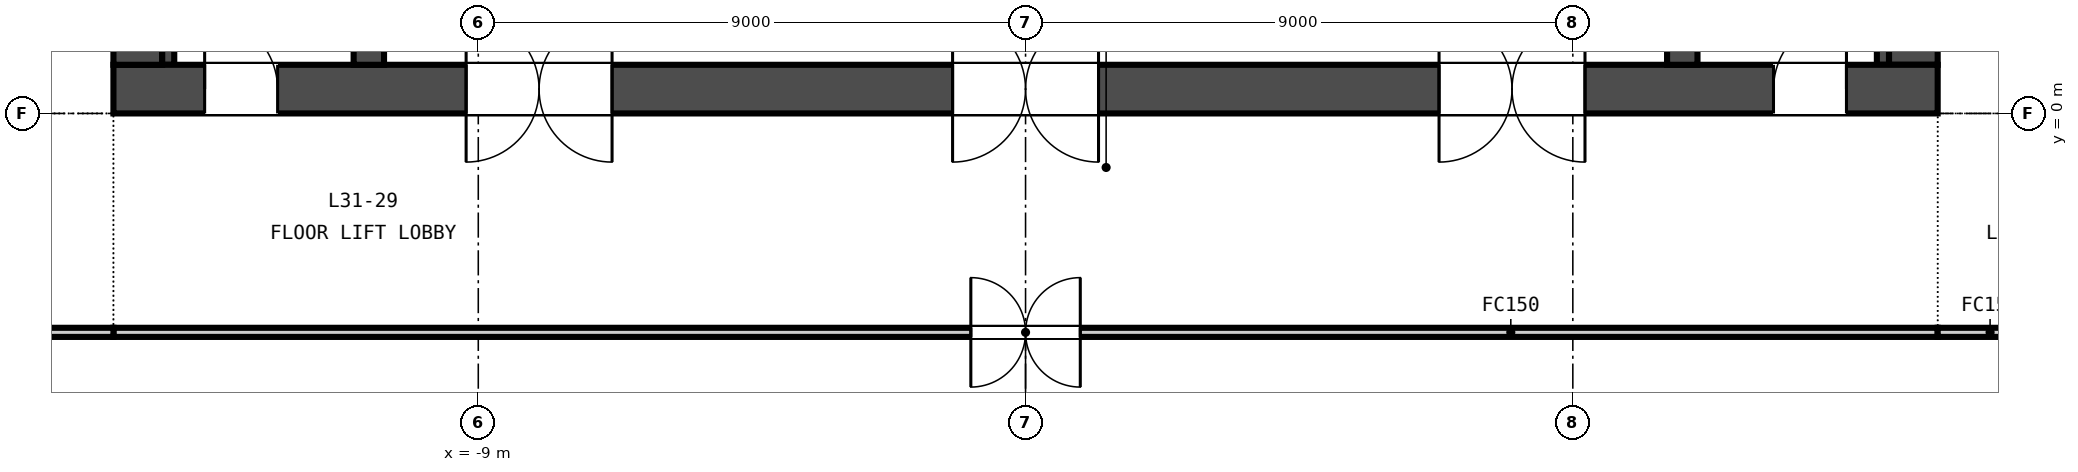
"""IFC4 building model, lengths in metres.
Left out: names, types, materials, properties, quantities, classifications, styles, units other than length and angle.
Written with IfcOpenShell. Run it as: python <this file> out.ifc"""

import sys

from ifc_helpers import new_model, si_unit, direction, frame, frame_2d, origin, place, context, subcontext, project, spatial, rectangle, extrude, element, fill, save


model = new_model("IFC4")
c1 = context("Model", 3, precision=1e-05, world=origin(), true_north=direction((0.0, 1.0)))
c2 = subcontext(c1, "Body", "Model", "MODEL_VIEW")
j1 = project(units=[si_unit("LENGTHUNIT", "METRE"), si_unit("PLANEANGLEUNIT", "RADIAN")], contexts=[c1])
p1 = place(None, origin())
s1 = spatial("IfcSite", under=j1, at=p1, CompositionType="ELEMENT")
p2 = place(p1, origin())
s2 = spatial("IfcBuilding", under=s1, at=p2, CompositionType="ELEMENT")
p3 = place(p2, frame((0.0, 0.0, 129.8)))
s3 = spatial("IfcBuildingStorey", under=s2, at=p3, CompositionType="ELEMENT", Elevation=129.8)
p4 = place(p3, frame((-15.0, 0.4, -0.15), z_axis=(0.0, 0.0, 1.0), x_axis=(1.0, 0.0, 0.0)))
e1 = element("IfcWall", 1, at=p4, inside=s3, PredefinedType="SOLIDWALL", context=c2, shape_type="SweptSolid", body=[
    extrude(rectangle(XDim=30.0, YDim=0.8, at=frame_2d((15.0, 0.0))), origin(), (0.0, 0.0, 1.0), 3.65),
])
p5 = place(p4, frame((5.8, 0.0, 0.15)))
e2 = element("IfcOpeningElement", 2, at=p5, cuts=e1, PredefinedType="OPENING", context=c2, shape_type="SweptSolid", body=[
    extrude(rectangle(XDim=2.4, YDim=2.4, at=frame_2d((1.2, 1.2))), frame((0.0, 0.41, 0.0), z_axis=(0.0, -1.0, 0.0), x_axis=(1.0, 0.0, 0.0)), (0.0, 0.0, 1.0), 0.82),
])
p6 = place(p4, frame((13.8, 0.0, 0.15)))
e3 = element("IfcOpeningElement", 3, at=p6, cuts=e1, PredefinedType="OPENING", context=c2, shape_type="SweptSolid", body=[
    extrude(rectangle(XDim=2.4, YDim=2.4, at=frame_2d((1.2, 1.2))), frame((0.0, 0.41, 0.0), z_axis=(0.0, -1.0, 0.0), x_axis=(1.0, 0.0, 0.0)), (0.0, 0.0, 1.0), 0.82),
])
p7 = place(p4, frame((21.8, 0.0, 0.15)))
e4 = element("IfcOpeningElement", 4, at=p7, cuts=e1, PredefinedType="OPENING", context=c2, shape_type="SweptSolid", body=[
    extrude(rectangle(XDim=2.4, YDim=2.4, at=frame_2d((1.2, 1.2))), frame((0.0, 0.41, 0.0), z_axis=(0.0, -1.0, 0.0), x_axis=(1.0, 0.0, 0.0)), (0.0, 0.0, 1.0), 0.82),
])
p8 = place(p4, frame((1.5, 0.0, 0.15)))
e5 = element("IfcOpeningElement", 5, at=p8, cuts=e1, PredefinedType="OPENING", context=c2, shape_type="SweptSolid", body=[
    extrude(rectangle(XDim=1.2, YDim=2.1, at=frame_2d((0.6, 1.05))), frame((0.0, 0.41, 0.0), z_axis=(0.0, -1.0, 0.0), x_axis=(1.0, 0.0, 0.0)), (0.0, 0.0, 1.0), 0.82),
])
p9 = place(p4, frame((27.3, 0.0, 0.15)))
e6 = element("IfcOpeningElement", 6, at=p9, cuts=e1, PredefinedType="OPENING", context=c2, shape_type="SweptSolid", body=[
    extrude(rectangle(XDim=1.2, YDim=2.1, at=frame_2d((0.6, 1.05))), frame((0.0, 0.41, 0.0), z_axis=(0.0, -1.0, 0.0), x_axis=(1.0, 0.0, 0.0)), (0.0, 0.0, 1.0), 0.82),
])
for number, where, z_axis, x_axis in (
    (7, (-14.6, 0.8, -0.15), (0.0, 0.0, 1.0), (0.0, 1.0, 0.0)),
    (8, (14.6, 0.8, -0.15), (0.0, 0.0, 1.0), (0.0, 1.0, 0.0)),
):
    element("IfcWall", number, at=place(p3, frame(where, z_axis=z_axis, x_axis=x_axis)), inside=s3, PredefinedType="SOLIDWALL", context=c2, shape_type="SweptSolid", body=[
        extrude(rectangle(XDim=13.4, YDim=0.8, at=frame_2d((6.7, 0.0))), origin(), (0.0, 0.0, 1.0), 3.65),
    ])
for number, where, z_axis, x_axis in (
    (9, (-10.8, 0.8, -0.15), (0.0, 0.0, 1.0), (0.0, 1.0, 0.0)),
    (10, (10.8, 0.8, -0.15), (0.0, 0.0, 1.0), (0.0, 1.0, 0.0)),
):
    element("IfcWall", number, at=place(p3, frame(where, z_axis=z_axis, x_axis=x_axis)), inside=s3, PredefinedType="SOLIDWALL", context=c2, shape_type="SweptSolid", body=[
        extrude(rectangle(XDim=13.4, YDim=0.5, at=frame_2d((6.7, 0.0))), origin(), (0.0, 0.0, 1.0), 3.65),
    ])
for number, where, z_axis, x_axis in (
    (11, (-14.1, 0.8, 0.0), (0.0, 0.0, 1.0), (0.0, 1.0, 0.0)),
    (12, (14.1, 0.8, 0.0), (0.0, 0.0, 1.0), (0.0, 1.0, 0.0)),
):
    element("IfcWall", number, at=place(p3, frame(where, z_axis=z_axis, x_axis=x_axis)), inside=s3, PredefinedType="SOLIDWALL", context=c2, shape_type="SweptSolid", body=[
        extrude(rectangle(XDim=13.4, YDim=0.2, at=frame_2d((6.7, 0.0))), origin(), (0.0, 0.0, 1.0), 3.5),
    ])
p10 = place(p3, frame((15.0, -3.6, 0.0), z_axis=(0.0, 0.0, 1.0), x_axis=(-1.0, 0.0, 0.0)))
e13 = element("IfcWall", 13, at=p10, inside=s3, PredefinedType="PARTITIONING", context=c2, shape_type="SweptSolid", body=[
    extrude(rectangle(XDim=30.0, YDim=0.15, at=frame_2d((15.0, 0.0))), origin(), (0.0, 0.0, 1.0), 2.741),
])
p11 = place(p10, frame((14.1, 0.0, 0.0)))
e14 = element("IfcOpeningElement", 14, at=p11, cuts=e13, PredefinedType="OPENING", context=c2, shape_type="SweptSolid", body=[
    extrude(rectangle(XDim=1.8, YDim=2.1, at=frame_2d((0.9, 1.05))), frame((0.0, 0.085, 0.0), z_axis=(0.0, -1.0, 0.0), x_axis=(1.0, 0.0, 0.0)), (0.0, 0.0, 1.0), 0.17),
])
p12 = place(p3, frame((16.714, -3.6, 0.0), z_axis=(0.0, 0.0, 1.0), x_axis=(-1.0, 0.0, 0.0)))
e15 = element("IfcWall", 15, at=p12, inside=s3, PredefinedType="PARTITIONING", context=c2, shape_type="SweptSolid", body=[
    extrude(rectangle(XDim=1.714, YDim=0.15, at=frame_2d((0.857, 0.0))), origin(), (0.0, 0.0, 1.0), 2.741),
])
p13 = place(p3, frame((-15.0, -3.6, 0.0), z_axis=(0.0, 0.0, 1.0), x_axis=(-1.0, 0.0, 0.0)))
e16 = element("IfcWall", 16, at=p13, inside=s3, PredefinedType="PARTITIONING", context=c2, shape_type="SweptSolid", body=[
    extrude(rectangle(XDim=3.9, YDim=0.15, at=frame_2d((1.95, 0.0))), origin(), (0.0, 0.0, 1.0), 2.741),
])
p14 = place(p5, origin())
e17 = element("IfcDoor", 17, at=p14, inside=s3, OperationType="DOUBLE_DOOR_DOUBLE_SWING", PredefinedType="DOOR", context=c2, shape_type="SweptSolid", body=[
    extrude(rectangle(XDim=2.4, YDim=2.4, at=frame_2d((1.2, 1.2))), frame((0.0, 0.025, 0.0), z_axis=(0.0, -1.0, 0.0), x_axis=(1.0, 0.0, 0.0)), (0.0, 0.0, 1.0), 0.05),
])
fill(e2, e17)
p15 = place(p6, origin())
e18 = element("IfcDoor", 18, at=p15, inside=s3, OperationType="DOUBLE_DOOR_DOUBLE_SWING", PredefinedType="DOOR", context=c2, shape_type="SweptSolid", body=[
    extrude(rectangle(XDim=2.4, YDim=2.4, at=frame_2d((1.2, 1.2))), frame((0.0, 0.025, 0.0), z_axis=(0.0, -1.0, 0.0), x_axis=(1.0, 0.0, 0.0)), (0.0, 0.0, 1.0), 0.05),
])
fill(e3, e18)
p16 = place(p7, origin())
e19 = element("IfcDoor", 19, at=p16, inside=s3, OperationType="DOUBLE_DOOR_DOUBLE_SWING", PredefinedType="DOOR", context=c2, shape_type="SweptSolid", body=[
    extrude(rectangle(XDim=2.4, YDim=2.4, at=frame_2d((1.2, 1.2))), frame((0.0, 0.025, 0.0), z_axis=(0.0, -1.0, 0.0), x_axis=(1.0, 0.0, 0.0)), (0.0, 0.0, 1.0), 0.05),
])
fill(e4, e19)
p17 = place(p8, origin())
e20 = element("IfcDoor", 20, at=p17, inside=s3, OperationType="SINGLE_SWING_LEFT", PredefinedType="DOOR", context=c2, shape_type="SweptSolid", body=[
    extrude(rectangle(XDim=1.2, YDim=2.1, at=frame_2d((0.6, 1.05))), frame((0.0, 0.025, 0.0), z_axis=(0.0, -1.0, 0.0), x_axis=(1.0, 0.0, 0.0)), (0.0, 0.0, 1.0), 0.05),
])
fill(e5, e20)
p18 = place(p9, origin())
e21 = element("IfcDoor", 21, at=p18, inside=s3, OperationType="SINGLE_SWING_RIGHT", PredefinedType="DOOR", context=c2, shape_type="SweptSolid", body=[
    extrude(rectangle(XDim=1.2, YDim=2.1, at=frame_2d((0.6, 1.05))), frame((0.0, 0.025, 0.0), z_axis=(0.0, -1.0, 0.0), x_axis=(1.0, 0.0, 0.0)), (0.0, 0.0, 1.0), 0.05),
])
fill(e6, e21)
p19 = place(p11, origin())
e22 = element("IfcDoor", 22, at=p19, inside=s3, OperationType="DOUBLE_DOOR_DOUBLE_SWING", PredefinedType="DOOR", context=c2, shape_type="SweptSolid", body=[
    extrude(rectangle(XDim=1.8, YDim=2.1, at=frame_2d((0.9, 1.05))), frame((0.0, 0.025, 0.0), z_axis=(0.0, -1.0, 0.0), x_axis=(1.0, 0.0, 0.0)), (0.0, 0.0, 1.0), 0.05),
])
fill(e14, e22)
save(model, sys.argv[1])
